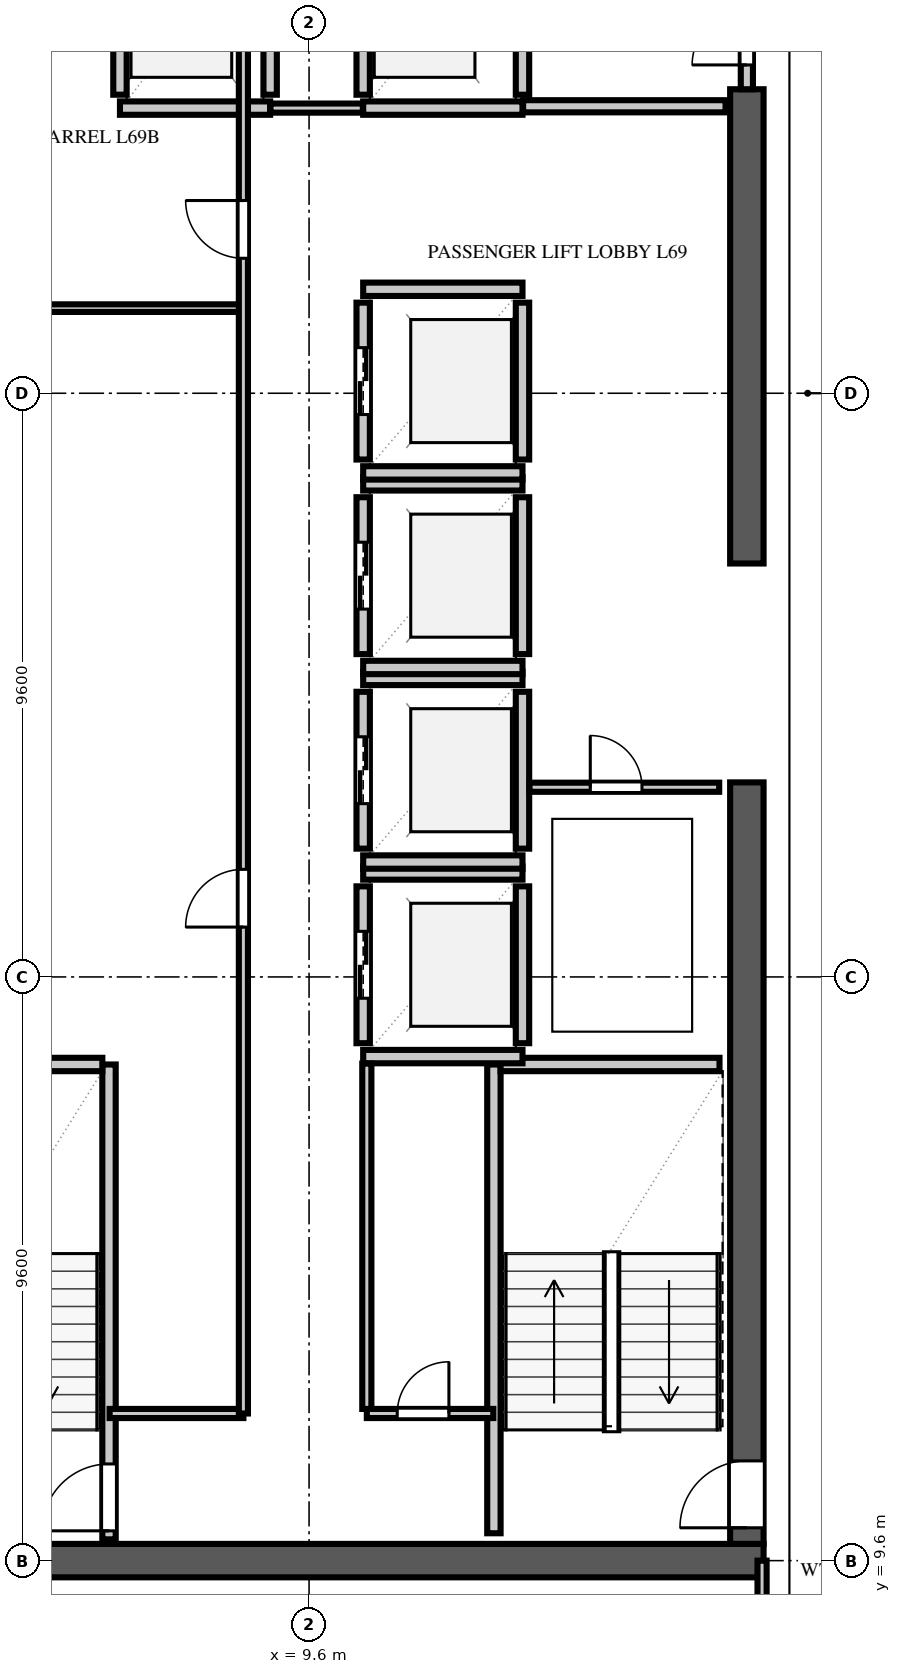
"""IFC4 building model, lengths in metres.
Left out: names, types, materials, properties, quantities, classifications, styles, units other than length and angle.
Written with IfcOpenShell. Run it as: python <this file> out.ifc"""

import sys

from ifc_helpers import new_model, si_unit, direction, frame, frame_2d, origin, place, context, subcontext, project, spatial, rectangle, extrude, element, fill, save


model = new_model("IFC4")
c1 = context("Model", 3, precision=1e-05, world=origin(), true_north=direction((0.0, 1.0)))
c2 = subcontext(c1, "Body", "Model", "MODEL_VIEW")
j1 = project(units=[si_unit("LENGTHUNIT", "METRE"), si_unit("PLANEANGLEUNIT", "RADIAN")], contexts=[c1])
p1 = place(None, origin())
s1 = spatial("IfcSite", under=j1, at=p1, CompositionType="ELEMENT")
p2 = place(p1, origin())
s2 = spatial("IfcBuilding", under=s1, at=p2, CompositionType="ELEMENT")
p3 = place(p2, frame((0.0, 0.0, 273.4)))
s3 = spatial("IfcBuildingStorey", under=s2, at=p3, CompositionType="ELEMENT", Elevation=273.4)
p4 = place(p3, frame((2.475, 9.6, 0.0), z_axis=(0.0, 0.0, 1.0), x_axis=(1.0, 0.0, 0.0)))
e1 = element("IfcWall", 1, at=p4, inside=s3, PredefinedType="SHEAR", context=c2, shape_type="SweptSolid", body=[
    extrude(rectangle(XDim=14.6, YDim=0.55, at=frame_2d((7.3, 0.0))), origin(), (0.0, 0.0, 1.0), 3.54),
])
p5 = place(p3, frame((16.8, 9.875, 0.0), z_axis=(0.0, 0.0, 1.0), x_axis=(0.0, 1.0, 0.0)))
e2 = element("IfcWall", 2, at=p5, inside=s3, PredefinedType="SHEAR", context=c2, shape_type="SweptSolid", body=[
    extrude(rectangle(XDim=12.525, YDim=0.55, at=frame_2d((6.262, 0.0))), origin(), (0.0, 0.0, 1.0), 3.54),
])
p6 = place(p5, frame((0.265, 0.0, 0.0)))
e3 = element("IfcOpeningElement", 3, at=p6, cuts=e2, PredefinedType="OPENING", context=c2, shape_type="SweptSolid", body=[
    extrude(rectangle(XDim=1.1, YDim=2.2, at=frame_2d((0.55, 1.1))), frame((0.0, 0.287, 0.0), z_axis=(0.0, -1.0, 0.0), x_axis=(1.0, 0.0, 0.0)), (0.0, 0.0, 1.0), 0.574),
])
p7 = place(p3, frame((16.8, 26.0, 0.0), z_axis=(0.0, 0.0, 1.0), x_axis=(0.0, 1.0, 0.0)))
e4 = element("IfcWall", 4, at=p7, inside=s3, PredefinedType="SHEAR", context=c2, shape_type="SweptSolid", body=[
    extrude(rectangle(XDim=7.8, YDim=0.55, at=frame_2d((3.9, 0.0))), origin(), (0.0, 0.0, 1.0), 3.54),
])
p8 = place(p3, frame((6.31, 9.95, 0.0), z_axis=(0.0, 0.0, 1.0), x_axis=(0.0, 1.0, 0.0)))
e5 = element("IfcWall", 5, at=p8, inside=s3, PredefinedType="SOLIDWALL", context=c2, shape_type="SweptSolid", body=[
    extrude(rectangle(XDim=7.81, YDim=0.22, at=frame_2d((3.905, 0.0))), origin(), (0.0, 0.0, 1.0), 3.54),
])
p9 = place(p8, frame((0.14, 0.0, 0.0)))
e6 = element("IfcOpeningElement", 6, at=p9, cuts=e5, PredefinedType="OPENING", context=c2, shape_type="SweptSolid", body=[
    extrude(rectangle(XDim=1.1, YDim=2.2, at=frame_2d((0.55, 1.1))), frame((0.0, 0.122, 0.0), z_axis=(0.0, -1.0, 0.0), x_axis=(1.0, 0.0, 0.0)), (0.0, 0.0, 1.0), 0.244),
])
p10 = place(p3, frame((2.65, 17.76, 0.0), z_axis=(0.0, 0.0, 1.0), x_axis=(1.0, 0.0, 0.0)))
e7 = element("IfcWall", 7, at=p10, inside=s3, PredefinedType="SOLIDWALL", context=c2, shape_type="SweptSolid", body=[
    extrude(rectangle(XDim=3.55, YDim=0.22, at=frame_2d((1.775, 0.0))), origin(), (0.0, 0.0, 1.0), 3.54),
])
p11 = place(p3, frame((12.64, 10.05, 0.0), z_axis=(0.0, 0.0, 1.0), x_axis=(0.0, 1.0, 0.0)))
e8 = element("IfcWall", 8, at=p11, inside=s3, PredefinedType="SOLIDWALL", context=c2, shape_type="SweptSolid", body=[
    extrude(rectangle(XDim=7.71, YDim=0.22, at=frame_2d((3.855, 0.0))), origin(), (0.0, 0.0, 1.0), 3.54),
])
p12 = place(p3, frame((12.75, 17.76, 0.0), z_axis=(0.0, 0.0, 1.0), x_axis=(1.0, 0.0, 0.0)))
e9 = element("IfcWall", 9, at=p12, inside=s3, PredefinedType="SOLIDWALL", context=c2, shape_type="SweptSolid", body=[
    extrude(rectangle(XDim=3.6, YDim=0.22, at=frame_2d((1.8, 0.0))), origin(), (0.0, 0.0, 1.0), 3.54),
])
p13 = place(p3, frame((10.49, 18.11, 0.0), z_axis=(0.0, 0.0, 1.0), x_axis=(0.0, 1.0, 0.0)))
e10 = element("IfcWall", 10, at=p13, inside=s3, PredefinedType="SOLIDWALL", context=c2, shape_type="SweptSolid", body=[
    extrude(rectangle(XDim=2.58, YDim=0.22, at=frame_2d((1.29, 0.0))), origin(), (0.0, 0.0, 1.0), 3.54),
])
p14 = place(p13, frame((0.74, 0.0, 0.0)))
e11 = element("IfcOpeningElement", 11, at=p14, cuts=e10, PredefinedType="OPENING", context=c2, shape_type="SweptSolid", body=[
    extrude(rectangle(XDim=1.1, YDim=2.2, at=frame_2d((0.55, 1.1))), frame((0.0, 0.122, 0.0), z_axis=(0.0, -1.0, 0.0), x_axis=(1.0, 0.0, 0.0)), (0.0, 0.0, 1.0), 0.244),
])
p15 = place(p3, frame((13.11, 18.11, 0.0), z_axis=(0.0, 0.0, 1.0), x_axis=(0.0, 1.0, 0.0)))
e12 = element("IfcWall", 12, at=p15, inside=s3, PredefinedType="SOLIDWALL", context=c2, shape_type="SweptSolid", body=[
    extrude(rectangle(XDim=2.58, YDim=0.22, at=frame_2d((1.29, 0.0))), origin(), (0.0, 0.0, 1.0), 3.54),
])
for number, where, z_axis, x_axis in (
    (13, (10.49, 17.89, 0.0), (0.0, 0.0, 1.0), (1.0, 0.0, 0.0)),
    (14, (10.49, 20.91, 0.0), (0.0, 0.0, 1.0), (1.0, 0.0, 0.0)),
):
    element("IfcWall", number, at=place(p3, frame(where, z_axis=z_axis, x_axis=x_axis)), inside=s3, PredefinedType="SOLIDWALL", context=c2, shape_type="SweptSolid", body=[
        extrude(rectangle(XDim=2.62, YDim=0.22, at=frame_2d((1.31, 0.0))), origin(), (0.0, 0.0, 1.0), 3.54),
    ])
p16 = place(p3, frame((10.49, 21.31, 0.0), z_axis=(0.0, 0.0, 1.0), x_axis=(0.0, 1.0, 0.0)))
e15 = element("IfcWall", 15, at=p16, inside=s3, PredefinedType="SOLIDWALL", context=c2, shape_type="SweptSolid", body=[
    extrude(rectangle(XDim=2.58, YDim=0.22, at=frame_2d((1.29, 0.0))), origin(), (0.0, 0.0, 1.0), 3.54),
])
p17 = place(p16, frame((0.74, 0.0, 0.0)))
e16 = element("IfcOpeningElement", 16, at=p17, cuts=e15, PredefinedType="OPENING", context=c2, shape_type="SweptSolid", body=[
    extrude(rectangle(XDim=1.1, YDim=2.2, at=frame_2d((0.55, 1.1))), frame((0.0, 0.122, 0.0), z_axis=(0.0, -1.0, 0.0), x_axis=(1.0, 0.0, 0.0)), (0.0, 0.0, 1.0), 0.244),
])
p18 = place(p3, frame((13.11, 21.31, 0.0), z_axis=(0.0, 0.0, 1.0), x_axis=(0.0, 1.0, 0.0)))
e17 = element("IfcWall", 17, at=p18, inside=s3, PredefinedType="SOLIDWALL", context=c2, shape_type="SweptSolid", body=[
    extrude(rectangle(XDim=2.58, YDim=0.22, at=frame_2d((1.29, 0.0))), origin(), (0.0, 0.0, 1.0), 3.54),
])
for number, where, z_axis, x_axis in (
    (18, (10.49, 21.09, 0.0), (0.0, 0.0, 1.0), (1.0, 0.0, 0.0)),
    (19, (10.49, 24.11, 0.0), (0.0, 0.0, 1.0), (1.0, 0.0, 0.0)),
):
    element("IfcWall", number, at=place(p3, frame(where, z_axis=z_axis, x_axis=x_axis)), inside=s3, PredefinedType="SOLIDWALL", context=c2, shape_type="SweptSolid", body=[
        extrude(rectangle(XDim=2.62, YDim=0.22, at=frame_2d((1.31, 0.0))), origin(), (0.0, 0.0, 1.0), 3.54),
    ])
p19 = place(p3, frame((10.49, 24.51, 0.0), z_axis=(0.0, 0.0, 1.0), x_axis=(0.0, 1.0, 0.0)))
e20 = element("IfcWall", 20, at=p19, inside=s3, PredefinedType="SOLIDWALL", context=c2, shape_type="SweptSolid", body=[
    extrude(rectangle(XDim=2.58, YDim=0.22, at=frame_2d((1.29, 0.0))), origin(), (0.0, 0.0, 1.0), 3.54),
])
p20 = place(p19, frame((0.74, 0.0, 0.0)))
e21 = element("IfcOpeningElement", 21, at=p20, cuts=e20, PredefinedType="OPENING", context=c2, shape_type="SweptSolid", body=[
    extrude(rectangle(XDim=1.1, YDim=2.2, at=frame_2d((0.55, 1.1))), frame((0.0, 0.122, 0.0), z_axis=(0.0, -1.0, 0.0), x_axis=(1.0, 0.0, 0.0)), (0.0, 0.0, 1.0), 0.244),
])
p21 = place(p3, frame((13.11, 24.51, 0.0), z_axis=(0.0, 0.0, 1.0), x_axis=(0.0, 1.0, 0.0)))
e22 = element("IfcWall", 22, at=p21, inside=s3, PredefinedType="SOLIDWALL", context=c2, shape_type="SweptSolid", body=[
    extrude(rectangle(XDim=2.58, YDim=0.22, at=frame_2d((1.29, 0.0))), origin(), (0.0, 0.0, 1.0), 3.54),
])
for number, where, z_axis, x_axis in (
    (23, (10.49, 24.29, 0.0), (0.0, 0.0, 1.0), (1.0, 0.0, 0.0)),
    (24, (10.49, 27.31, 0.0), (0.0, 0.0, 1.0), (1.0, 0.0, 0.0)),
):
    element("IfcWall", number, at=place(p3, frame(where, z_axis=z_axis, x_axis=x_axis)), inside=s3, PredefinedType="SOLIDWALL", context=c2, shape_type="SweptSolid", body=[
        extrude(rectangle(XDim=2.62, YDim=0.22, at=frame_2d((1.31, 0.0))), origin(), (0.0, 0.0, 1.0), 3.54),
    ])
p22 = place(p3, frame((10.49, 27.71, 0.0), z_axis=(0.0, 0.0, 1.0), x_axis=(0.0, 1.0, 0.0)))
e25 = element("IfcWall", 25, at=p22, inside=s3, PredefinedType="SOLIDWALL", context=c2, shape_type="SweptSolid", body=[
    extrude(rectangle(XDim=2.58, YDim=0.22, at=frame_2d((1.29, 0.0))), origin(), (0.0, 0.0, 1.0), 3.54),
])
p23 = place(p22, frame((0.74, 0.0, 0.0)))
e26 = element("IfcOpeningElement", 26, at=p23, cuts=e25, PredefinedType="OPENING", context=c2, shape_type="SweptSolid", body=[
    extrude(rectangle(XDim=1.1, YDim=2.2, at=frame_2d((0.55, 1.1))), frame((0.0, 0.122, 0.0), z_axis=(0.0, -1.0, 0.0), x_axis=(1.0, 0.0, 0.0)), (0.0, 0.0, 1.0), 0.244),
])
p24 = place(p3, frame((13.11, 27.71, 0.0), z_axis=(0.0, 0.0, 1.0), x_axis=(0.0, 1.0, 0.0)))
e27 = element("IfcWall", 27, at=p24, inside=s3, PredefinedType="SOLIDWALL", context=c2, shape_type="SweptSolid", body=[
    extrude(rectangle(XDim=2.58, YDim=0.22, at=frame_2d((1.29, 0.0))), origin(), (0.0, 0.0, 1.0), 3.54),
])
for number, where, z_axis, x_axis in (
    (28, (10.49, 27.49, 0.0), (0.0, 0.0, 1.0), (1.0, 0.0, 0.0)),
    (29, (10.49, 30.51, 0.0), (0.0, 0.0, 1.0), (1.0, 0.0, 0.0)),
):
    element("IfcWall", number, at=place(p3, frame(where, z_axis=z_axis, x_axis=x_axis)), inside=s3, PredefinedType="SOLIDWALL", context=c2, shape_type="SweptSolid", body=[
        extrude(rectangle(XDim=2.62, YDim=0.22, at=frame_2d((1.31, 0.0))), origin(), (0.0, 0.0, 1.0), 3.54),
    ])
for number, where, z_axis, x_axis in (
    (30, (6.49, 33.71, 0.0), (0.0, 0.0, 1.0), (0.0, 1.0, 0.0)),
    (31, (8.96, 33.71, 0.0), (0.0, 0.0, 1.0), (0.0, 1.0, 0.0)),
):
    element("IfcWall", number, at=place(p3, frame(where, z_axis=z_axis, x_axis=x_axis)), inside=s3, PredefinedType="SOLIDWALL", context=c2, shape_type="SweptSolid", body=[
        extrude(rectangle(XDim=2.78, YDim=0.22, at=frame_2d((1.39, 0.0))), origin(), (0.0, 0.0, 1.0), 3.54),
    ])
p25 = place(p3, frame((6.49, 33.49, 0.0), z_axis=(0.0, 0.0, 1.0), x_axis=(1.0, 0.0, 0.0)))
e32 = element("IfcWall", 32, at=p25, inside=s3, PredefinedType="SOLIDWALL", context=c2, shape_type="SweptSolid", body=[
    extrude(rectangle(XDim=2.47, YDim=0.22, at=frame_2d((1.235, 0.0))), origin(), (0.0, 0.0, 1.0), 3.54),
])
for number, where, z_axis, x_axis in (
    (33, (10.49, 33.71, 0.0), (0.0, 0.0, 1.0), (0.0, 1.0, 0.0)),
    (34, (13.11, 33.71, 0.0), (0.0, 0.0, 1.0), (0.0, 1.0, 0.0)),
):
    element("IfcWall", number, at=place(p3, frame(where, z_axis=z_axis, x_axis=x_axis)), inside=s3, PredefinedType="SOLIDWALL", context=c2, shape_type="SweptSolid", body=[
        extrude(rectangle(XDim=2.78, YDim=0.22, at=frame_2d((1.39, 0.0))), origin(), (0.0, 0.0, 1.0), 3.54),
    ])
p26 = place(p3, frame((10.49, 33.49, 0.0), z_axis=(0.0, 0.0, 1.0), x_axis=(1.0, 0.0, 0.0)))
e35 = element("IfcWall", 35, at=p26, inside=s3, PredefinedType="SOLIDWALL", context=c2, shape_type="SweptSolid", body=[
    extrude(rectangle(XDim=2.62, YDim=0.22, at=frame_2d((1.31, 0.0))), origin(), (0.0, 0.0, 1.0), 3.54),
])
p27 = place(p3, frame((13.12, 33.52, 0.0), z_axis=(0.0, 0.0, 1.0), x_axis=(1.0, 0.0, 0.0)))
e36 = element("IfcWall", 36, at=p27, inside=s3, PredefinedType="SOLIDWALL", context=c2, shape_type="SweptSolid", body=[
    extrude(rectangle(XDim=3.33, YDim=0.2, at=frame_2d((1.665, 0.0))), origin(), (0.0, 0.0, 1.0), 3.54),
])
p28 = place(p3, frame((16.8, 33.8, 0.0), z_axis=(0.0, 0.0, 1.0), x_axis=(0.0, 1.0, 0.0)))
e37 = element("IfcWall", 37, at=p28, inside=s3, PredefinedType="SOLIDWALL", context=c2, shape_type="SweptSolid", body=[
    extrude(rectangle(XDim=2.6, YDim=0.2, at=frame_2d((1.3, 0.0))), origin(), (0.0, 0.0, 1.0), 3.54),
])
p29 = place(p28, frame((0.4, 0.0, 0.0)))
e38 = element("IfcOpeningElement", 38, at=p29, cuts=e37, PredefinedType="OPENING", context=c2, shape_type="SweptSolid", body=[
    extrude(rectangle(XDim=1.8, YDim=2.2, at=frame_2d((0.9, 1.1))), frame((0.0, 0.112, 0.0), z_axis=(0.0, -1.0, 0.0), x_axis=(1.0, 0.0, 0.0)), (0.0, 0.0, 1.0), 0.224),
])
p30 = place(p3, frame((8.965, 33.49, 0.0), z_axis=(0.0, 0.0, 1.0), x_axis=(1.0, 0.0, 0.0)))
e39 = element("IfcWall", 39, at=p30, inside=s3, PredefinedType="PARTITIONING", context=c2, shape_type="SweptSolid", body=[
    extrude(rectangle(XDim=1.52, YDim=0.15, at=frame_2d((0.76, 0.0))), origin(), (0.0, 0.0, 1.0), 3.54),
])
p31 = place(p3, frame((10.55, 12.02, 0.0), z_axis=(0.0, 0.0, 1.0), x_axis=(1.0, 0.0, 0.0)))
e40 = element("IfcWall", 40, at=p31, inside=s3, PredefinedType="PARTITIONING", context=c2, shape_type="SweptSolid", body=[
    extrude(rectangle(XDim=2.08, YDim=0.15, at=frame_2d((1.04, 0.0))), origin(), (0.0, 0.0, 1.0), 3.54),
])
p32 = place(p31, frame((0.5, 0.0, 0.0)))
e41 = element("IfcOpeningElement", 41, at=p32, cuts=e40, PredefinedType="OPENING", context=c2, shape_type="SweptSolid", body=[
    extrude(rectangle(XDim=0.85, YDim=2.1, at=frame_2d((0.425, 1.05))), frame((0.0, 0.087, 0.0), z_axis=(0.0, -1.0, 0.0), x_axis=(1.0, 0.0, 0.0)), (0.0, 0.0, 1.0), 0.174),
])
p33 = place(p3, frame((10.55, 12.095, 0.0), z_axis=(0.0, 0.0, 1.0), x_axis=(0.0, 1.0, 0.0)))
e42 = element("IfcWall", 42, at=p33, inside=s3, PredefinedType="PARTITIONING", context=c2, shape_type="SweptSolid", body=[
    extrude(rectangle(XDim=5.68, YDim=0.15, at=frame_2d((2.84, 0.0))), origin(), (0.0, 0.0, 1.0), 3.54),
])
p34 = place(p3, frame((13.225, 22.32, 0.0), z_axis=(0.0, 0.0, 1.0), x_axis=(1.0, 0.0, 0.0)))
e43 = element("IfcWall", 43, at=p34, inside=s3, PredefinedType="PARTITIONING", context=c2, shape_type="SweptSolid", body=[
    extrude(rectangle(XDim=3.12, YDim=0.15, at=frame_2d((1.56, 0.0))), origin(), (0.0, 0.0, 1.0), 3.54),
])
p35 = place(p34, frame((1.0, 0.0, 0.0)))
e44 = element("IfcOpeningElement", 44, at=p35, cuts=e43, PredefinedType="OPENING", context=c2, shape_type="SweptSolid", body=[
    extrude(rectangle(XDim=0.85, YDim=2.1, at=frame_2d((0.425, 1.05))), frame((0.0, 0.087, 0.0), z_axis=(0.0, -1.0, 0.0), x_axis=(1.0, 0.0, 0.0)), (0.0, 0.0, 1.0), 0.174),
])
p36 = place(p3, frame((6.32, 12.02, 0.0), z_axis=(0.0, 0.0, 1.0), x_axis=(1.0, 0.0, 0.0)))
e45 = element("IfcWall", 45, at=p36, inside=s3, PredefinedType="PARTITIONING", context=c2, shape_type="SweptSolid", body=[
    extrude(rectangle(XDim=2.2, YDim=0.15, at=frame_2d((1.1, 0.0))), origin(), (0.0, 0.0, 1.0), 3.54),
])
p37 = place(p3, frame((2.65, 30.2, 0.0), z_axis=(0.0, 0.0, 1.0), x_axis=(1.0, 0.0, 0.0)))
e46 = element("IfcWall", 46, at=p37, inside=s3, PredefinedType="PARTITIONING", context=c2, shape_type="SweptSolid", body=[
    extrude(rectangle(XDim=5.87, YDim=0.125, at=frame_2d((2.935, 0.0))), origin(), (0.0, 0.0, 1.0), 3.54),
])
p38 = place(p3, frame((8.52, 12.02, 0.0), z_axis=(0.0, 0.0, 1.0), x_axis=(0.0, 1.0, 0.0)))
e47 = element("IfcWall", 47, at=p38, inside=s3, PredefinedType="PARTITIONING", context=c2, shape_type="SweptSolid", body=[
    extrude(rectangle(XDim=24.76, YDim=0.15, at=frame_2d((12.38, 0.0))), origin(), (0.0, 0.0, 1.0), 3.54),
])
p39 = place(p38, frame((8.0, 0.0, 0.0)))
e48 = element("IfcOpeningElement", 48, at=p39, cuts=e47, PredefinedType="OPENING", context=c2, shape_type="SweptSolid", body=[
    extrude(rectangle(XDim=0.95, YDim=2.15, at=frame_2d((0.475, 1.075))), frame((0.0, 0.087, 0.0), z_axis=(0.0, -1.0, 0.0), x_axis=(1.0, 0.0, 0.0)), (0.0, 0.0, 1.0), 0.174),
])
p40 = place(p38, frame((19.0, 0.0, 0.0)))
e49 = element("IfcOpeningElement", 49, at=p40, cuts=e47, PredefinedType="OPENING", context=c2, shape_type="SweptSolid", body=[
    extrude(rectangle(XDim=0.95, YDim=2.15, at=frame_2d((0.475, 1.075))), frame((0.0, 0.087, 0.0), z_axis=(0.0, -1.0, 0.0), x_axis=(1.0, 0.0, 0.0)), (0.0, 0.0, 1.0), 0.174),
])
p41 = place(p3, frame((17.05, 0.22, 0.0), z_axis=(0.0, 0.0, 1.0), x_axis=(0.0, 1.0, 0.0)))
e50 = element("IfcWall", 50, at=p41, inside=s3, PredefinedType="PARTITIONING", context=c2, shape_type="SweptSolid", body=[
    extrude(rectangle(XDim=9.38, YDim=0.15, at=frame_2d((4.69, 0.0))), origin(), (0.0, 0.0, 1.0), 3.54),
])
p42 = place(p41, frame((5.58, 0.0, 0.0)))
e51 = element("IfcOpeningElement", 51, at=p42, cuts=e50, PredefinedType="OPENING", context=c2, shape_type="SweptSolid", body=[
    extrude(rectangle(XDim=2.0, YDim=2.3, at=frame_2d((1.0, 1.15))), frame((0.0, 0.087, 0.0), z_axis=(0.0, -1.0, 0.0), x_axis=(1.0, 0.0, 0.0)), (0.0, 0.0, 1.0), 0.174),
])
p43 = place(p9, origin())
e52 = element("IfcDoor", 52, at=p43, inside=s3, OperationType="SINGLE_SWING_LEFT", PredefinedType="DOOR", context=c2, shape_type="SweptSolid", body=[
    extrude(rectangle(XDim=1.1, YDim=2.2, at=frame_2d((0.55, 1.1))), frame((0.0, 0.025, 0.0), z_axis=(0.0, -1.0, 0.0), x_axis=(1.0, 0.0, 0.0)), (0.0, 0.0, 1.0), 0.05),
])
fill(e6, e52)
p44 = place(p6, origin())
e53 = element("IfcDoor", 53, at=p44, inside=s3, OperationType="SINGLE_SWING_LEFT", PredefinedType="DOOR", context=c2, shape_type="SweptSolid", body=[
    extrude(rectangle(XDim=1.1, YDim=2.2, at=frame_2d((0.55, 1.1))), frame((0.0, 0.025, 0.0), z_axis=(0.0, -1.0, 0.0), x_axis=(1.0, 0.0, 0.0)), (0.0, 0.0, 1.0), 0.05),
])
fill(e3, e53)
p45 = place(p14, origin())
e54 = element("IfcDoor", 54, at=p45, inside=s3, OperationType="DOUBLE_DOOR_SLIDING", PredefinedType="DOOR", context=c2, shape_type="SweptSolid", body=[
    extrude(rectangle(XDim=1.1, YDim=2.2, at=frame_2d((0.55, 1.1))), frame((0.0, 0.025, 0.0), z_axis=(0.0, -1.0, 0.0), x_axis=(1.0, 0.0, 0.0)), (0.0, 0.0, 1.0), 0.05),
])
fill(e11, e54)
p46 = place(p17, origin())
e55 = element("IfcDoor", 55, at=p46, inside=s3, OperationType="DOUBLE_DOOR_SLIDING", PredefinedType="DOOR", context=c2, shape_type="SweptSolid", body=[
    extrude(rectangle(XDim=1.1, YDim=2.2, at=frame_2d((0.55, 1.1))), frame((0.0, 0.025, 0.0), z_axis=(0.0, -1.0, 0.0), x_axis=(1.0, 0.0, 0.0)), (0.0, 0.0, 1.0), 0.05),
])
fill(e16, e55)
p47 = place(p20, origin())
e56 = element("IfcDoor", 56, at=p47, inside=s3, OperationType="DOUBLE_DOOR_SLIDING", PredefinedType="DOOR", context=c2, shape_type="SweptSolid", body=[
    extrude(rectangle(XDim=1.1, YDim=2.2, at=frame_2d((0.55, 1.1))), frame((0.0, 0.025, 0.0), z_axis=(0.0, -1.0, 0.0), x_axis=(1.0, 0.0, 0.0)), (0.0, 0.0, 1.0), 0.05),
])
fill(e21, e56)
p48 = place(p23, origin())
e57 = element("IfcDoor", 57, at=p48, inside=s3, OperationType="DOUBLE_DOOR_SLIDING", PredefinedType="DOOR", context=c2, shape_type="SweptSolid", body=[
    extrude(rectangle(XDim=1.1, YDim=2.2, at=frame_2d((0.55, 1.1))), frame((0.0, 0.025, 0.0), z_axis=(0.0, -1.0, 0.0), x_axis=(1.0, 0.0, 0.0)), (0.0, 0.0, 1.0), 0.05),
])
fill(e26, e57)
p49 = place(p29, origin())
e58 = element("IfcDoor", 58, at=p49, inside=s3, OperationType="DOUBLE_DOOR_SINGLE_SWING", PredefinedType="DOOR", context=c2, shape_type="SweptSolid", body=[
    extrude(rectangle(XDim=1.8, YDim=2.2, at=frame_2d((0.9, 1.1))), frame((0.0, 0.025, 0.0), z_axis=(0.0, -1.0, 0.0), x_axis=(1.0, 0.0, 0.0)), (0.0, 0.0, 1.0), 0.05),
])
fill(e38, e58)
p50 = place(p32, origin())
e59 = element("IfcDoor", 59, at=p50, inside=s3, OperationType="SINGLE_SWING_RIGHT", PredefinedType="DOOR", context=c2, shape_type="SweptSolid", body=[
    extrude(rectangle(XDim=0.85, YDim=2.1, at=frame_2d((0.425, 1.05))), frame((0.0, 0.025, 0.0), z_axis=(0.0, -1.0, 0.0), x_axis=(1.0, 0.0, 0.0)), (0.0, 0.0, 1.0), 0.05),
])
fill(e41, e59)
p51 = place(p35, origin())
e60 = element("IfcDoor", 60, at=p51, inside=s3, OperationType="SINGLE_SWING_LEFT", PredefinedType="DOOR", context=c2, shape_type="SweptSolid", body=[
    extrude(rectangle(XDim=0.85, YDim=2.1, at=frame_2d((0.425, 1.05))), frame((0.0, 0.025, 0.0), z_axis=(0.0, -1.0, 0.0), x_axis=(1.0, 0.0, 0.0)), (0.0, 0.0, 1.0), 0.05),
])
fill(e44, e60)
p52 = place(p39, origin())
e61 = element("IfcDoor", 61, at=p52, inside=s3, OperationType="SINGLE_SWING_LEFT", PredefinedType="DOOR", context=c2, shape_type="SweptSolid", body=[
    extrude(rectangle(XDim=0.95, YDim=2.15, at=frame_2d((0.475, 1.075))), frame((0.0, 0.025, 0.0), z_axis=(0.0, -1.0, 0.0), x_axis=(1.0, 0.0, 0.0)), (0.0, 0.0, 1.0), 0.05),
])
fill(e48, e61)
p53 = place(p40, origin())
e62 = element("IfcDoor", 62, at=p53, inside=s3, OperationType="SINGLE_SWING_RIGHT", PredefinedType="DOOR", context=c2, shape_type="SweptSolid", body=[
    extrude(rectangle(XDim=0.95, YDim=2.15, at=frame_2d((0.475, 1.075))), frame((0.0, 0.025, 0.0), z_axis=(0.0, -1.0, 0.0), x_axis=(1.0, 0.0, 0.0)), (0.0, 0.0, 1.0), 0.05),
])
fill(e49, e62)
save(model, sys.argv[1])
